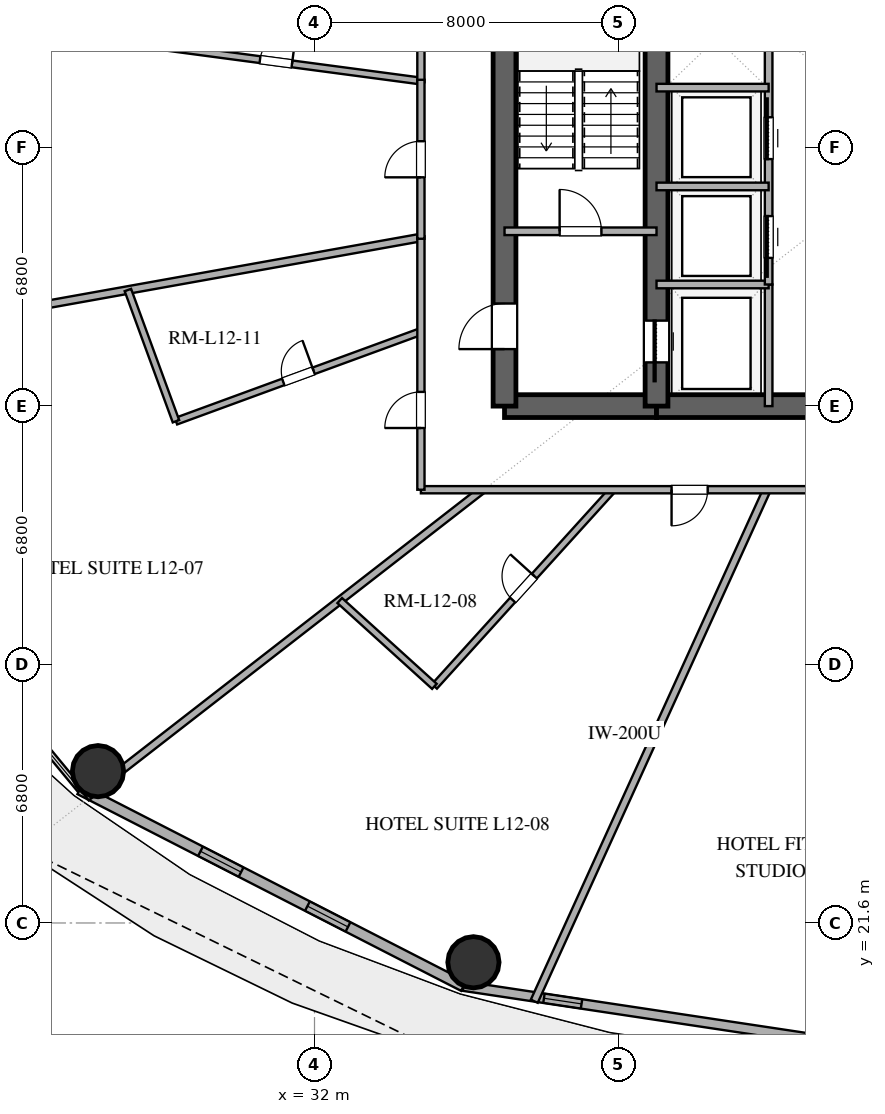
"""IFC4 building model, lengths in metres.
Left out: names, types, materials, properties, quantities, classifications, styles, units other than length and angle.
Written with IfcOpenShell. Run it as: python <this file> out.ifc"""

import sys

from ifc_helpers import new_model, si_unit, direction, frame, frame_2d, origin, origin_2d, place, context, subcontext, project, spatial, rectangle, hollow_circle, extrude, element, fill, save


model = new_model("IFC4")
c1 = context("Model", 3, precision=1e-05, world=origin(), true_north=direction((0.0, 1.0)))
c2 = subcontext(c1, "Body", "Model", "MODEL_VIEW")
j1 = project(units=[si_unit("LENGTHUNIT", "METRE"), si_unit("PLANEANGLEUNIT", "RADIAN")], contexts=[c1])
p1 = place(None, origin())
s1 = spatial("IfcSite", under=j1, at=p1, CompositionType="ELEMENT")
p2 = place(p1, origin())
s2 = spatial("IfcBuilding", under=s1, at=p2, CompositionType="ELEMENT")
p3 = place(p2, frame((0.0, 0.0, 53.4)))
s3 = spatial("IfcBuildingStorey", under=s2, at=p3, CompositionType="ELEMENT", Elevation=53.4)
p4 = place(p3, frame((37.0, 35.2, 0.0), z_axis=(0.0, 0.0, 1.0), x_axis=(1.0, 0.0, 0.0)))
e1 = element("IfcWall", 1, at=p4, inside=s3, PredefinedType="SHEAR", context=c2, shape_type="SweptSolid", body=[
    extrude(rectangle(XDim=4.0, YDim=0.6, at=frame_2d((2.0, 0.0))), origin(), (0.0, 0.0, 1.0), 3.38),
])
p5 = place(p3, frame((41.0, 35.2, 0.0), z_axis=(0.0, 0.0, 1.0), x_axis=(1.0, 0.0, 0.0)))
e2 = element("IfcWall", 2, at=p5, inside=s3, PredefinedType="SHEAR", context=c2, shape_type="SweptSolid", body=[
    extrude(rectangle(XDim=14.0, YDim=0.6, at=frame_2d((7.0, 0.0))), origin(), (0.0, 0.0, 1.0), 3.38),
])
p6 = place(p5, frame((6.1, 0.0, 0.0)))
e3 = element("IfcOpeningElement", 3, at=p6, cuts=e2, PredefinedType="OPENING", context=c2, shape_type="SweptSolid", body=[
    extrude(rectangle(XDim=1.8, YDim=2.25, at=frame_2d((0.9, 1.125))), frame((0.0, 0.31, 0.0), z_axis=(0.0, -1.0, 0.0), x_axis=(1.0, 0.0, 0.0)), (0.0, 0.0, 1.0), 0.62),
])
p7 = place(p3, frame((37.0, 35.2, 0.0), z_axis=(0.0, 0.0, 1.0), x_axis=(0.0, 1.0, 0.0)))
e4 = element("IfcWall", 4, at=p7, inside=s3, PredefinedType="SHEAR", context=c2, shape_type="SweptSolid", body=[
    extrude(rectangle(XDim=13.6, YDim=0.6, at=frame_2d((6.8, 0.0))), origin(), (0.0, 0.0, 1.0), 3.38),
])
p8 = place(p7, frame((1.5, 0.0, 0.0)))
e5 = element("IfcOpeningElement", 5, at=p8, cuts=e4, PredefinedType="OPENING", context=c2, shape_type="SweptSolid", body=[
    extrude(rectangle(XDim=1.2, YDim=2.15, at=frame_2d((0.6, 1.075))), frame((0.0, 0.31, 0.0), z_axis=(0.0, -1.0, 0.0), x_axis=(1.0, 0.0, 0.0)), (0.0, 0.0, 1.0), 0.62),
])
p9 = place(p3, frame((41.0, 35.2, 0.0), z_axis=(0.0, 0.0, 1.0), x_axis=(0.0, 1.0, 0.0)))
e6 = element("IfcWall", 6, at=p9, inside=s3, PredefinedType="SHEAR", context=c2, shape_type="SweptSolid", body=[
    extrude(rectangle(XDim=13.6, YDim=0.6, at=frame_2d((6.8, 0.0))), origin(), (0.0, 0.0, 1.0), 3.38),
])
p10 = place(p9, frame((1.15, 0.0, 0.0)))
e7 = element("IfcOpeningElement", 7, at=p10, cuts=e6, PredefinedType="OPENING", context=c2, shape_type="SweptSolid", body=[
    extrude(rectangle(XDim=1.1, YDim=2.2, at=frame_2d((0.55, 1.1))), frame((0.0, 0.31, 0.0), z_axis=(0.0, -1.0, 0.0), x_axis=(1.0, 0.0, 0.0)), (0.0, 0.0, 1.0), 0.62),
])
for number, where, z_axis, x_axis in (
    (8, (26.303, 25.595, 0.0), (0.0, 0.0, 1.0), (1.0, 0.0, 0.0)),
    (9, (36.182, 20.566, 0.0), (0.0, 0.0, 1.0), (1.0, 0.0, 0.0)),
):
    element("IfcColumn", number, at=place(p3, frame(where, z_axis=z_axis, x_axis=x_axis)), inside=s3, PredefinedType="COLUMN", context=c2, shape_type="SweptSolid", body=[
        extrude(hollow_circle(Radius=0.675, WallThickness=0.036, at=origin_2d()), origin(), (0.0, 0.0, 1.0), 3.38),
    ])
p11 = place(p3, frame((25.826, 25.114, 0.0), z_axis=(0.0, 0.0, 1.0), x_axis=(0.889853976658, -0.456245438581, 0.0)))
e10 = element("IfcWall", 10, at=p11, inside=s3, PredefinedType="SOLIDWALL", context=c2, shape_type="SweptSolid", body=[
    extrude(rectangle(XDim=11.346, YDim=0.28, at=frame_2d((5.673, 0.0))), origin(), (0.0, 0.0, 1.0), 3.38),
])
p12 = place(p11, frame((3.567, 0.0, 0.85)))
e11 = element("IfcOpeningElement", 11, at=p12, cuts=e10, PredefinedType="OPENING", context=c2, shape_type="SweptSolid", body=[
    extrude(rectangle(XDim=1.2, YDim=1.6, at=frame_2d((0.6, 0.8))), frame((0.0, 0.15, 0.0), z_axis=(0.0, -1.0, 0.0), x_axis=(1.0, 0.0, 0.0)), (0.0, 0.0, 1.0), 0.3),
])
p13 = place(p11, frame((6.729, 0.0, 0.85)))
e12 = element("IfcOpeningElement", 12, at=p13, cuts=e10, PredefinedType="OPENING", context=c2, shape_type="SweptSolid", body=[
    extrude(rectangle(XDim=1.2, YDim=1.6, at=frame_2d((0.6, 0.8))), frame((0.0, 0.15, 0.0), z_axis=(0.0, -1.0, 0.0), x_axis=(1.0, 0.0, 0.0)), (0.0, 0.0, 1.0), 0.3),
])
p14 = place(p3, frame((35.922, 19.938, 0.0), z_axis=(0.0, 0.0, 1.0), x_axis=(0.988864835849, -0.148816452121, 0.0)))
e13 = element("IfcWall", 13, at=p14, inside=s3, PredefinedType="SOLIDWALL", context=c2, shape_type="SweptSolid", body=[
    extrude(rectangle(XDim=12.214, YDim=0.25, at=frame_2d((6.107, 0.0))), origin(), (0.0, 0.0, 1.0), 3.38),
])
p15 = place(p14, frame((2.139, 0.0, 1.42)))
e14 = element("IfcOpeningElement", 14, at=p15, cuts=e13, PredefinedType="OPENING", context=c2, shape_type="SweptSolid", body=[
    extrude(rectangle(XDim=1.0, YDim=1.05, at=frame_2d((0.5, 0.525))), frame((0.0, 0.135, 0.0), z_axis=(0.0, -1.0, 0.0), x_axis=(1.0, 0.0, 0.0)), (0.0, 0.0, 1.0), 0.27),
])
p16 = place(p3, frame((37.0, 39.8, 0.0), z_axis=(0.0, 0.0, 1.0), x_axis=(1.0, 0.0, 0.0)))
e15 = element("IfcWall", 15, at=p16, inside=s3, PredefinedType="SOLIDWALL", context=c2, shape_type="SweptSolid", body=[
    extrude(rectangle(XDim=4.0, YDim=0.2, at=frame_2d((2.0, 0.0))), origin(), (0.0, 0.0, 1.0), 2.74),
])
p17 = place(p16, frame((1.45, 0.0, 0.0)))
e16 = element("IfcOpeningElement", 16, at=p17, cuts=e15, PredefinedType="OPENING", context=c2, shape_type="SweptSolid", body=[
    extrude(rectangle(XDim=1.1, YDim=2.15, at=frame_2d((0.55, 1.075))), frame((0.0, 0.11, 0.0), z_axis=(0.0, -1.0, 0.0), x_axis=(1.0, 0.0, 0.0)), (0.0, 0.0, 1.0), 0.22),
])
p18 = place(p3, frame((43.95, 35.2, 0.0), z_axis=(0.0, 0.0, 1.0), x_axis=(0.0, 1.0, 0.0)))
e17 = element("IfcWall", 17, at=p18, inside=s3, PredefinedType="SOLIDWALL", context=c2, shape_type="SweptSolid", body=[
    extrude(rectangle(XDim=3.2, YDim=0.2, at=frame_2d((1.6, 0.0))), origin(), (0.0, 0.0, 1.0), 2.74),
])
p19 = place(p3, frame((41.0, 38.4, 0.0), z_axis=(0.0, 0.0, 1.0), x_axis=(1.0, 0.0, 0.0)))
e18 = element("IfcWall", 18, at=p19, inside=s3, PredefinedType="SOLIDWALL", context=c2, shape_type="SweptSolid", body=[
    extrude(rectangle(XDim=2.95, YDim=0.2, at=frame_2d((1.475, 0.0))), origin(), (0.0, 0.0, 1.0), 2.74),
])
p20 = place(p3, frame((43.95, 38.4, 0.0), z_axis=(0.0, 0.0, 1.0), x_axis=(0.0, 1.0, 0.0)))
e19 = element("IfcWall", 19, at=p20, inside=s3, PredefinedType="SOLIDWALL", context=c2, shape_type="SweptSolid", body=[
    extrude(rectangle(XDim=7.8, YDim=0.2, at=frame_2d((3.9, 0.0))), origin(), (0.0, 0.0, 1.0), 2.74),
])
p21 = place(p20, frame((0.7, 0.0, 0.0)))
e20 = element("IfcOpeningElement", 20, at=p21, cuts=e19, PredefinedType="OPENING", context=c2, shape_type="SweptSolid", body=[
    extrude(rectangle(XDim=1.1, YDim=2.2, at=frame_2d((0.55, 1.1))), frame((0.0, 0.11, 0.0), z_axis=(0.0, -1.0, 0.0), x_axis=(1.0, 0.0, 0.0)), (0.0, 0.0, 1.0), 0.22),
])
p22 = place(p20, frame((3.3, 0.0, 0.0)))
e21 = element("IfcOpeningElement", 21, at=p22, cuts=e19, PredefinedType="OPENING", context=c2, shape_type="SweptSolid", body=[
    extrude(rectangle(XDim=1.1, YDim=2.2, at=frame_2d((0.55, 1.1))), frame((0.0, 0.11, 0.0), z_axis=(0.0, -1.0, 0.0), x_axis=(1.0, 0.0, 0.0)), (0.0, 0.0, 1.0), 0.22),
])
for number, where, z_axis, x_axis in (
    (22, (41.0, 40.98, 0.0), (0.0, 0.0, 1.0), (1.0, 0.0, 0.0)),
    (23, (41.0, 43.58, 0.0), (0.0, 0.0, 1.0), (1.0, 0.0, 0.0)),
):
    element("IfcWall", number, at=place(p3, frame(where, z_axis=z_axis, x_axis=x_axis)), inside=s3, PredefinedType="SOLIDWALL", context=c2, shape_type="SweptSolid", body=[
        extrude(rectangle(XDim=2.95, YDim=0.2, at=frame_2d((1.475, 0.0))), origin(), (0.0, 0.0, 1.0), 2.74),
    ])
p23 = place(p3, frame((37.783, 19.541, 0.0), z_axis=(0.0, 0.0, 1.0), x_axis=(0.414087801136, 0.910236943301, 0.0)))
e24 = element("IfcWall", 24, at=p23, inside=s3, PredefinedType="PARTITIONING", context=c2, shape_type="SweptSolid", body=[
    extrude(rectangle(XDim=14.786, YDim=0.2, at=frame_2d((7.393, 0.0))), origin(), (0.0, 0.0, 1.0), 2.74),
])
p24 = place(p3, frame((34.8, 39.636, 0.0), z_axis=(0.0, 0.0, 1.0), x_axis=(-0.984338200058, -0.176290407871, 0.0)))
e25 = element("IfcWall", 25, at=p24, inside=s3, PredefinedType="PARTITIONING", context=c2, shape_type="SweptSolid", body=[
    extrude(rectangle(XDim=16.653, YDim=0.2, at=frame_2d((8.327, 0.0))), origin(), (0.0, 0.0, 1.0), 2.74),
])
p25 = place(p3, frame((36.417, 33.0, 0.0), z_axis=(0.0, 0.0, 1.0), x_axis=(-0.789656987139, -0.613548565855, 0.0)))
e26 = element("IfcWall", 26, at=p25, inside=s3, PredefinedType="PARTITIONING", context=c2, shape_type="SweptSolid", body=[
    extrude(rectangle(XDim=13.195, YDim=0.2, at=frame_2d((6.597, 0.0))), origin(), (0.0, 0.0, 1.0), 2.74),
])
p26 = place(p3, frame((27.173, 44.768, 0.0), z_axis=(0.0, 0.0, 1.0), x_axis=(0.991283239225, -0.131748015661, 0.0)))
e27 = element("IfcWall", 27, at=p26, inside=s3, PredefinedType="PLUMBINGWALL", context=c2, shape_type="SweptSolid", body=[
    extrude(rectangle(XDim=7.694, YDim=0.18, at=frame_2d((3.847, 0.0))), origin(), (0.0, 0.0, 1.0), 2.74),
])
p27 = place(p26, frame((3.422, 0.0, 0.0)))
e28 = element("IfcOpeningElement", 28, at=p27, cuts=e27, PredefinedType="OPENING", context=c2, shape_type="SweptSolid", body=[
    extrude(rectangle(XDim=0.85, YDim=2.1, at=frame_2d((0.425, 1.05))), frame((0.0, 0.1, 0.0), z_axis=(0.0, -1.0, 0.0), x_axis=(1.0, 0.0, 0.0)), (0.0, 0.0, 1.0), 0.2),
])
p28 = place(p3, frame((35.155, 27.826, 0.0), z_axis=(0.0, 0.0, 1.0), x_axis=(0.671533822983, 0.740973902773, 0.0)))
e29 = element("IfcWall", 29, at=p28, inside=s3, PredefinedType="PLUMBINGWALL", context=c2, shape_type="SweptSolid", body=[
    extrude(rectangle(XDim=6.982, YDim=0.18, at=frame_2d((3.491, 0.0))), origin(), (0.0, 0.0, 1.0), 2.74),
])
p29 = place(p28, frame((3.066, 0.0, 0.0)))
e30 = element("IfcOpeningElement", 30, at=p29, cuts=e29, PredefinedType="OPENING", context=c2, shape_type="SweptSolid", body=[
    extrude(rectangle(XDim=0.85, YDim=2.1, at=frame_2d((0.425, 1.05))), frame((0.0, 0.1, 0.0), z_axis=(0.0, -1.0, 0.0), x_axis=(1.0, 0.0, 0.0)), (0.0, 0.0, 1.0), 0.2),
])
p30 = place(p3, frame((28.354, 34.802, 0.0), z_axis=(0.0, 0.0, 1.0), x_axis=(0.938953689431, 0.344043556986, 0.0)))
e31 = element("IfcWall", 31, at=p30, inside=s3, PredefinedType="PLUMBINGWALL", context=c2, shape_type="SweptSolid", body=[
    extrude(rectangle(XDim=6.865, YDim=0.18, at=frame_2d((3.433, 0.0))), origin(), (0.0, 0.0, 1.0), 2.74),
])
p31 = place(p30, frame((3.007, 0.0, 0.0)))
e32 = element("IfcOpeningElement", 32, at=p31, cuts=e31, PredefinedType="OPENING", context=c2, shape_type="SweptSolid", body=[
    extrude(rectangle(XDim=0.85, YDim=2.1, at=frame_2d((0.425, 1.05))), frame((0.0, 0.1, 0.0), z_axis=(0.0, -1.0, 0.0), x_axis=(1.0, 0.0, 0.0)), (0.0, 0.0, 1.0), 0.2),
])
p32 = place(p3, frame((34.8, 43.722, 0.0), z_axis=(0.0, 0.0, 1.0), x_axis=(0.0, 1.0, 0.0)))
e33 = element("IfcWall", 33, at=p32, inside=s3, PredefinedType="PARTITIONING", context=c2, shape_type="SweptSolid", body=[
    extrude(rectangle(XDim=7.278, YDim=0.19, at=frame_2d((3.639, 0.0))), origin(), (0.0, 0.0, 1.0), 2.74),
])
p33 = place(p32, frame((4.372, 0.0, 0.0)))
e34 = element("IfcOpeningElement", 34, at=p33, cuts=e33, PredefinedType="OPENING", context=c2, shape_type="SweptSolid", body=[
    extrude(rectangle(XDim=0.95, YDim=2.15, at=frame_2d((0.475, 1.075))), frame((0.0, 0.105, 0.0), z_axis=(0.0, -1.0, 0.0), x_axis=(1.0, 0.0, 0.0)), (0.0, 0.0, 1.0), 0.21),
])
p34 = place(p3, frame((50.144, 33.0, 0.0), z_axis=(0.0, 0.0, 1.0), x_axis=(-1.0, 0.0, 0.0)))
e35 = element("IfcWall", 35, at=p34, inside=s3, PredefinedType="PARTITIONING", context=c2, shape_type="SweptSolid", body=[
    extrude(rectangle(XDim=15.344, YDim=0.19, at=frame_2d((7.672, 0.0))), origin(), (0.0, 0.0, 1.0), 2.74),
])
p35 = place(p34, frame((3.438, 0.0, 0.0)))
e36 = element("IfcOpeningElement", 36, at=p35, cuts=e35, PredefinedType="OPENING", context=c2, shape_type="SweptSolid", body=[
    extrude(rectangle(XDim=1.0, YDim=2.2, at=frame_2d((0.5, 1.1))), frame((0.0, 0.105, 0.0), z_axis=(0.0, -1.0, 0.0), x_axis=(1.0, 0.0, 0.0)), (0.0, 0.0, 1.0), 0.21),
])
p36 = place(p34, frame((7.798, 0.0, 0.0)))
e37 = element("IfcOpeningElement", 37, at=p36, cuts=e35, PredefinedType="OPENING", context=c2, shape_type="SweptSolid", body=[
    extrude(rectangle(XDim=0.95, YDim=2.15, at=frame_2d((0.475, 1.075))), frame((0.0, 0.105, 0.0), z_axis=(0.0, -1.0, 0.0), x_axis=(1.0, 0.0, 0.0)), (0.0, 0.0, 1.0), 0.21),
])
p37 = place(p3, frame((34.8, 33.0, 0.0), z_axis=(0.0, 0.0, 1.0), x_axis=(0.0, 1.0, 0.0)))
e38 = element("IfcWall", 38, at=p37, inside=s3, PredefinedType="PARTITIONING", context=c2, shape_type="SweptSolid", body=[
    extrude(rectangle(XDim=6.668, YDim=0.19, at=frame_2d((3.334, 0.0))), origin(), (0.0, 0.0, 1.0), 2.74),
])
p38 = place(p37, frame((1.624, 0.0, 0.0)))
e39 = element("IfcOpeningElement", 39, at=p38, cuts=e38, PredefinedType="OPENING", context=c2, shape_type="SweptSolid", body=[
    extrude(rectangle(XDim=0.95, YDim=2.15, at=frame_2d((0.475, 1.075))), frame((0.0, 0.105, 0.0), z_axis=(0.0, -1.0, 0.0), x_axis=(1.0, 0.0, 0.0)), (0.0, 0.0, 1.0), 0.21),
])
p39 = place(p3, frame((34.8, 39.604, 0.0), z_axis=(0.0, 0.0, 1.0), x_axis=(0.0, 1.0, 0.0)))
e40 = element("IfcWall", 40, at=p39, inside=s3, PredefinedType="PARTITIONING", context=c2, shape_type="SweptSolid", body=[
    extrude(rectangle(XDim=4.183, YDim=0.19, at=frame_2d((2.091, 0.0))), origin(), (0.0, 0.0, 1.0), 2.74),
])
p40 = place(p39, frame((1.616, 0.0, 0.0)))
e41 = element("IfcOpeningElement", 41, at=p40, cuts=e40, PredefinedType="OPENING", context=c2, shape_type="SweptSolid", body=[
    extrude(rectangle(XDim=0.95, YDim=2.15, at=frame_2d((0.475, 1.075))), frame((0.0, 0.105, 0.0), z_axis=(0.0, -1.0, 0.0), x_axis=(1.0, 0.0, 0.0)), (0.0, 0.0, 1.0), 0.21),
])
p41 = place(p3, frame((27.089, 38.255, 0.0), z_axis=(0.0, 0.0, 1.0), x_axis=(0.344012760863, -0.938964972916, 0.0)))
e42 = element("IfcWall", 42, at=p41, inside=s3, PredefinedType="PLUMBINGWALL", context=c2, shape_type="SweptSolid", body=[
    extrude(rectangle(XDim=3.677, YDim=0.18, at=frame_2d((1.839, 0.0))), origin(), (0.0, 0.0, 1.0), 2.74),
])
p42 = place(p3, frame((32.664, 30.084, 0.0), z_axis=(0.0, 0.0, 1.0), x_axis=(0.740964368308, -0.67154434321, 0.0)))
e43 = element("IfcWall", 43, at=p42, inside=s3, PredefinedType="PLUMBINGWALL", context=c2, shape_type="SweptSolid", body=[
    extrude(rectangle(XDim=3.362, YDim=0.18, at=frame_2d((1.681, 0.0))), origin(), (0.0, 0.0, 1.0), 2.74),
])
p43 = place(p12, origin())
e44 = element("IfcWindow", 44, at=p43, inside=s3, PartitioningType="SINGLE_PANEL", PredefinedType="WINDOW", context=c2, shape_type="SweptSolid", body=[
    extrude(rectangle(XDim=1.2, YDim=1.6, at=frame_2d((0.6, 0.8))), frame((0.0, 0.03, 0.0), z_axis=(0.0, -1.0, 0.0), x_axis=(1.0, 0.0, 0.0)), (0.0, 0.0, 1.0), 0.06),
])
fill(e11, e44)
p44 = place(p13, origin())
e45 = element("IfcWindow", 45, at=p44, inside=s3, PartitioningType="SINGLE_PANEL", PredefinedType="WINDOW", context=c2, shape_type="SweptSolid", body=[
    extrude(rectangle(XDim=1.2, YDim=1.6, at=frame_2d((0.6, 0.8))), frame((0.0, 0.03, 0.0), z_axis=(0.0, -1.0, 0.0), x_axis=(1.0, 0.0, 0.0)), (0.0, 0.0, 1.0), 0.06),
])
fill(e12, e45)
p45 = place(p15, origin())
e46 = element("IfcWindow", 46, at=p45, inside=s3, PartitioningType="SINGLE_PANEL", PredefinedType="WINDOW", context=c2, shape_type="SweptSolid", body=[
    extrude(rectangle(XDim=1.0, YDim=1.05, at=frame_2d((0.5, 0.525))), frame((0.0, 0.03, 0.0), z_axis=(0.0, -1.0, 0.0), x_axis=(1.0, 0.0, 0.0)), (0.0, 0.0, 1.0), 0.06),
])
fill(e14, e46)
p46 = place(p10, origin())
e47 = element("IfcDoor", 47, at=p46, inside=s3, OperationType="SLIDING_TO_LEFT", PredefinedType="DOOR", context=c2, shape_type="SweptSolid", body=[
    extrude(rectangle(XDim=1.1, YDim=2.2, at=frame_2d((0.55, 1.1))), frame((0.0, 0.025, 0.0), z_axis=(0.0, -1.0, 0.0), x_axis=(1.0, 0.0, 0.0)), (0.0, 0.0, 1.0), 0.05),
])
fill(e7, e47)
p47 = place(p8, origin())
e48 = element("IfcDoor", 48, at=p47, inside=s3, OperationType="SINGLE_SWING_LEFT", PredefinedType="DOOR", context=c2, shape_type="SweptSolid", body=[
    extrude(rectangle(XDim=1.2, YDim=2.15, at=frame_2d((0.6, 1.075))), frame((0.0, 0.025, 0.0), z_axis=(0.0, -1.0, 0.0), x_axis=(1.0, 0.0, 0.0)), (0.0, 0.0, 1.0), 0.05),
])
fill(e5, e48)
p48 = place(p17, origin())
e49 = element("IfcDoor", 49, at=p48, inside=s3, OperationType="SINGLE_SWING_LEFT", PredefinedType="DOOR", context=c2, shape_type="SweptSolid", body=[
    extrude(rectangle(XDim=1.1, YDim=2.15, at=frame_2d((0.55, 1.075))), frame((0.0, 0.025, 0.0), z_axis=(0.0, -1.0, 0.0), x_axis=(1.0, 0.0, 0.0)), (0.0, 0.0, 1.0), 0.05),
])
fill(e16, e49)
p49 = place(p21, origin())
e50 = element("IfcDoor", 50, at=p49, inside=s3, OperationType="SLIDING_TO_LEFT", PredefinedType="DOOR", context=c2, shape_type="SweptSolid", body=[
    extrude(rectangle(XDim=1.1, YDim=2.2, at=frame_2d((0.55, 1.1))), frame((0.0, 0.025, 0.0), z_axis=(0.0, -1.0, 0.0), x_axis=(1.0, 0.0, 0.0)), (0.0, 0.0, 1.0), 0.05),
])
fill(e20, e50)
p50 = place(p22, origin())
e51 = element("IfcDoor", 51, at=p50, inside=s3, OperationType="SLIDING_TO_RIGHT", PredefinedType="DOOR", context=c2, shape_type="SweptSolid", body=[
    extrude(rectangle(XDim=1.1, YDim=2.2, at=frame_2d((0.55, 1.1))), frame((0.0, 0.025, 0.0), z_axis=(0.0, -1.0, 0.0), x_axis=(1.0, 0.0, 0.0)), (0.0, 0.0, 1.0), 0.05),
])
fill(e21, e51)
p51 = place(p27, origin())
e52 = element("IfcDoor", 52, at=p51, inside=s3, OperationType="SINGLE_SWING_RIGHT", PredefinedType="DOOR", context=c2, shape_type="SweptSolid", body=[
    extrude(rectangle(XDim=0.85, YDim=2.1, at=frame_2d((0.425, 1.05))), frame((0.0, 0.025, 0.0), z_axis=(0.0, -1.0, 0.0), x_axis=(1.0, 0.0, 0.0)), (0.0, 0.0, 1.0), 0.05),
])
fill(e28, e52)
p52 = place(p29, origin())
e53 = element("IfcDoor", 53, at=p52, inside=s3, OperationType="SINGLE_SWING_RIGHT", PredefinedType="DOOR", context=c2, shape_type="SweptSolid", body=[
    extrude(rectangle(XDim=0.85, YDim=2.1, at=frame_2d((0.425, 1.05))), frame((0.0, 0.025, 0.0), z_axis=(0.0, -1.0, 0.0), x_axis=(1.0, 0.0, 0.0)), (0.0, 0.0, 1.0), 0.05),
])
fill(e30, e53)
p53 = place(p31, origin())
e54 = element("IfcDoor", 54, at=p53, inside=s3, OperationType="SINGLE_SWING_RIGHT", PredefinedType="DOOR", context=c2, shape_type="SweptSolid", body=[
    extrude(rectangle(XDim=0.85, YDim=2.1, at=frame_2d((0.425, 1.05))), frame((0.0, 0.025, 0.0), z_axis=(0.0, -1.0, 0.0), x_axis=(1.0, 0.0, 0.0)), (0.0, 0.0, 1.0), 0.05),
])
fill(e32, e54)
p54 = place(p36, origin())
e55 = element("IfcDoor", 55, at=p54, inside=s3, OperationType="SINGLE_SWING_RIGHT", PredefinedType="DOOR", context=c2, shape_type="SweptSolid", body=[
    extrude(rectangle(XDim=0.95, YDim=2.15, at=frame_2d((0.475, 1.075))), frame((0.0, 0.025, 0.0), z_axis=(0.0, -1.0, 0.0), x_axis=(1.0, 0.0, 0.0)), (0.0, 0.0, 1.0), 0.05),
])
fill(e37, e55)
p55 = place(p38, origin())
e56 = element("IfcDoor", 56, at=p55, inside=s3, OperationType="SINGLE_SWING_LEFT", PredefinedType="DOOR", context=c2, shape_type="SweptSolid", body=[
    extrude(rectangle(XDim=0.95, YDim=2.15, at=frame_2d((0.475, 1.075))), frame((0.0, 0.025, 0.0), z_axis=(0.0, -1.0, 0.0), x_axis=(1.0, 0.0, 0.0)), (0.0, 0.0, 1.0), 0.05),
])
fill(e39, e56)
p56 = place(p40, origin())
e57 = element("IfcDoor", 57, at=p56, inside=s3, OperationType="SINGLE_SWING_LEFT", PredefinedType="DOOR", context=c2, shape_type="SweptSolid", body=[
    extrude(rectangle(XDim=0.95, YDim=2.15, at=frame_2d((0.475, 1.075))), frame((0.0, 0.025, 0.0), z_axis=(0.0, -1.0, 0.0), x_axis=(1.0, 0.0, 0.0)), (0.0, 0.0, 1.0), 0.05),
])
fill(e41, e57)
save(model, sys.argv[1])
